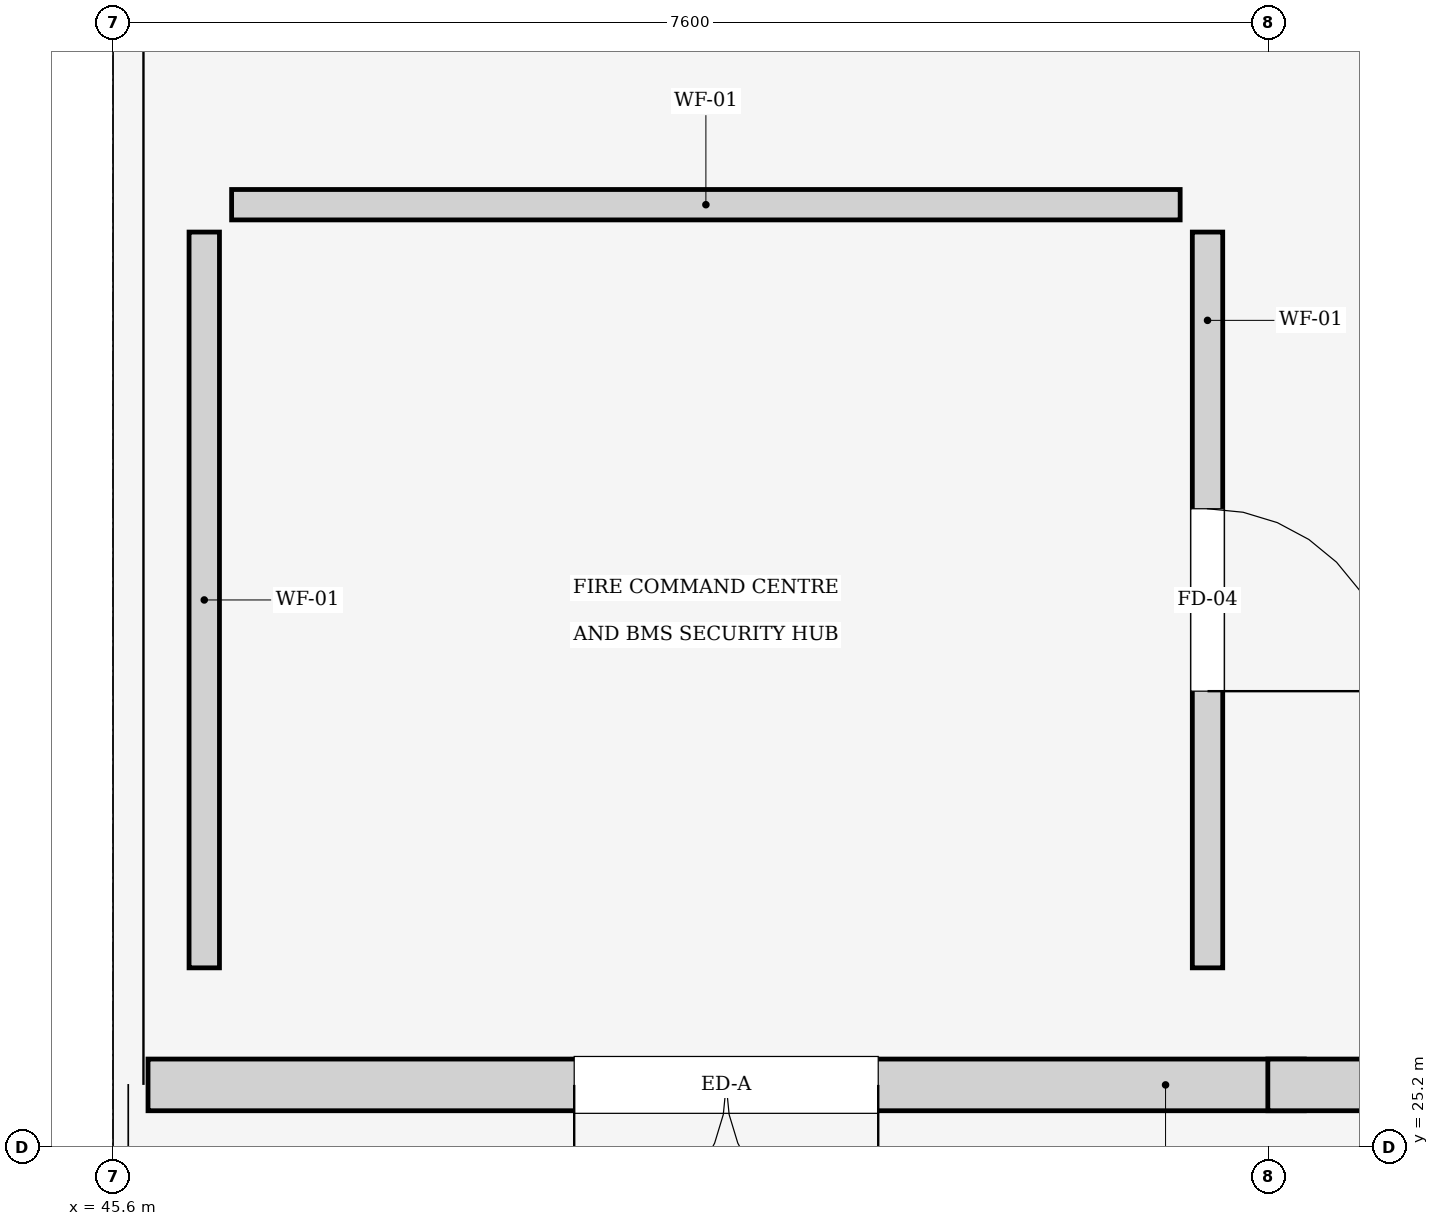
"""IFC4 building model, lengths in metres.
Left out: names, types, materials, properties, quantities, classifications, styles, units other than length and angle.
Written with IfcOpenShell. Run it as: python <this file> out.ifc"""

import sys

from ifc_helpers import new_model, si_unit, direction, frame, frame_2d, origin, place, context, subcontext, project, spatial, rectangle, extrude, element, fill, save


model = new_model("IFC4")
c1 = context("Model", 3, precision=1e-05, world=origin(), true_north=direction((0.0, 1.0)))
c2 = subcontext(c1, "Body", "Model", "MODEL_VIEW")
j1 = project(units=[si_unit("LENGTHUNIT", "METRE"), si_unit("PLANEANGLEUNIT", "RADIAN")], contexts=[c1])
p1 = place(None, origin())
s1 = spatial("IfcSite", under=j1, at=p1, CompositionType="ELEMENT")
p2 = place(p1, origin())
s2 = spatial("IfcBuilding", under=s1, at=p2, CompositionType="ELEMENT")
p3 = place(p2, origin())
s3 = spatial("IfcBuildingStorey", under=s2, at=p3, CompositionType="ELEMENT", Elevation=0.0)
p4 = place(p3, frame((53.437, 25.61, 0.0), z_axis=(0.0, 0.0, 1.0), x_axis=(-1.0, 0.0, 0.0)))
e1 = element("IfcWall", 1, at=p4, inside=s3, PredefinedType="STANDARD", context=c2, shape_type="SweptSolid", body=[
    extrude(rectangle(XDim=7.607, YDim=0.34, at=frame_2d((3.803, 0.0))), origin(), (0.0, 0.0, 1.0), 4.75),
])
p5 = place(p4, frame((2.803, 0.0, 0.0)))
e2 = element("IfcOpeningElement", 2, at=p5, cuts=e1, PredefinedType="OPENING", context=c2, shape_type="SweptSolid", body=[
    extrude(rectangle(XDim=2.0, YDim=2.4, at=frame_2d((1.0, 1.2))), frame((0.0, 0.18, 0.0), z_axis=(0.0, -1.0, 0.0), x_axis=(1.0, 0.0, 0.0)), (0.0, 0.0, 1.0), 0.36),
])
p6 = place(p3, frame((60.803, 25.61, 0.0), z_axis=(0.0, 0.0, 1.0), x_axis=(-1.0, 0.0, 0.0)))
e3 = element("IfcWall", 3, at=p6, inside=s3, PredefinedType="STANDARD", context=c2, shape_type="SweptSolid", body=[
    extrude(rectangle(XDim=7.606, YDim=0.34, at=frame_2d((3.803, 0.0))), origin(), (0.0, 0.0, 1.0), 4.75),
])
p7 = place(p6, frame((2.803, 0.0, 0.0)))
e4 = element("IfcOpeningElement", 4, at=p7, cuts=e3, PredefinedType="OPENING", context=c2, shape_type="SweptSolid", body=[
    extrude(rectangle(XDim=2.0, YDim=2.4, at=frame_2d((1.0, 1.2))), frame((0.0, 0.18, 0.0), z_axis=(0.0, -1.0, 0.0), x_axis=(1.0, 0.0, 0.0)), (0.0, 0.0, 1.0), 0.36),
])
p8 = place(p3, frame((52.8, 31.22, 0.0), z_axis=(0.0, 0.0, 1.0), x_axis=(0.0, -1.0, 0.0)))
e5 = element("IfcWall", 5, at=p8, inside=s3, PredefinedType="PARTITIONING", context=c2, shape_type="SweptSolid", body=[
    extrude(rectangle(XDim=4.84, YDim=0.2, at=frame_2d((2.42, 0.0))), origin(), (0.0, 0.0, 1.0), 4.73),
])
p9 = place(p8, frame((1.82, 0.0, 0.0)))
e6 = element("IfcOpeningElement", 6, at=p9, cuts=e5, PredefinedType="OPENING", context=c2, shape_type="SweptSolid", body=[
    extrude(rectangle(XDim=1.2, YDim=2.2, at=frame_2d((0.6, 1.1))), frame((0.0, 0.11, 0.0), z_axis=(0.0, -1.0, 0.0), x_axis=(1.0, 0.0, 0.0)), (0.0, 0.0, 1.0), 0.22),
])
p10 = place(p3, frame((46.38, 31.4, 0.0), z_axis=(0.0, 0.0, 1.0), x_axis=(1.0, 0.0, 0.0)))
e7 = element("IfcWall", 7, at=p10, inside=s3, PredefinedType="PARTITIONING", context=c2, shape_type="SweptSolid", body=[
    extrude(rectangle(XDim=6.24, YDim=0.2, at=frame_2d((3.12, 0.0))), origin(), (0.0, 0.0, 1.0), 4.73),
])
p11 = place(p3, frame((46.2, 26.38, 0.0), z_axis=(0.0, 0.0, 1.0), x_axis=(0.0, 1.0, 0.0)))
e8 = element("IfcWall", 8, at=p11, inside=s3, PredefinedType="PARTITIONING", context=c2, shape_type="SweptSolid", body=[
    extrude(rectangle(XDim=4.84, YDim=0.2, at=frame_2d((2.42, 0.0))), origin(), (0.0, 0.0, 1.0), 4.73),
])
p12 = place(p5, origin())
e9 = element("IfcDoor", 9, at=p12, inside=s3, OperationType="DOUBLE_DOOR_SINGLE_SWING", PredefinedType="DOOR", context=c2, shape_type="SweptSolid", body=[
    extrude(rectangle(XDim=2.0, YDim=2.4, at=frame_2d((1.0, 1.2))), frame((0.0, 0.025, 0.0), z_axis=(0.0, -1.0, 0.0), x_axis=(1.0, 0.0, 0.0)), (0.0, 0.0, 1.0), 0.05),
])
fill(e2, e9)
p13 = place(p9, origin())
e10 = element("IfcDoor", 10, at=p13, inside=s3, OperationType="SINGLE_SWING_RIGHT", PredefinedType="DOOR", context=c2, shape_type="SweptSolid", body=[
    extrude(rectangle(XDim=1.2, YDim=2.2, at=frame_2d((0.6, 1.1))), frame((0.0, 0.025, 0.0), z_axis=(0.0, -1.0, 0.0), x_axis=(1.0, 0.0, 0.0)), (0.0, 0.0, 1.0), 0.05),
])
fill(e6, e10)
save(model, sys.argv[1])
